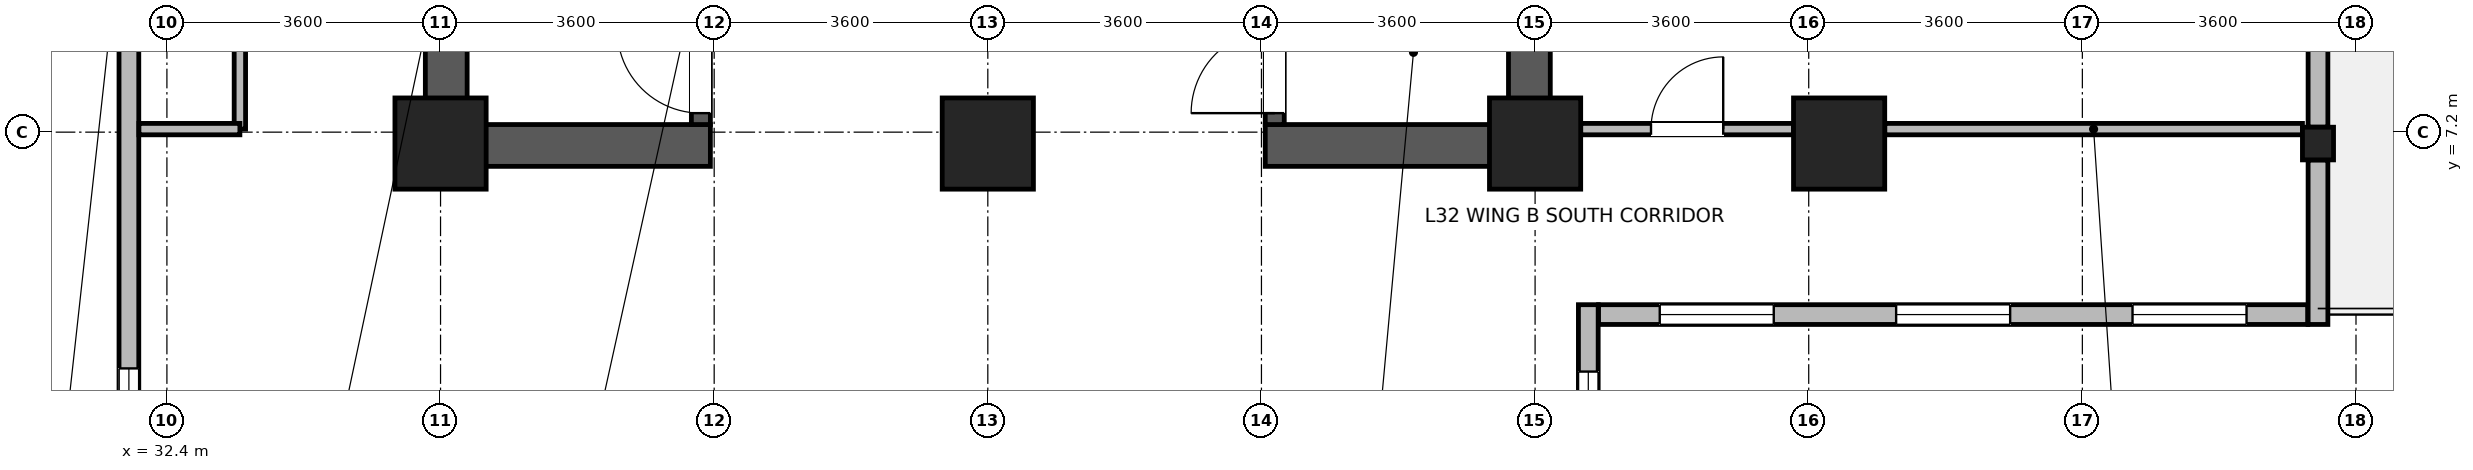
"""IFC4 building model, lengths in metres.
Left out: names, types, materials, properties, quantities, classifications, styles, units other than length and angle.
Written with IfcOpenShell. Run it as: python <this file> out.ifc"""

import sys

from ifc_helpers import new_model, si_unit, direction, frame, frame_2d, origin, origin_2d, place, context, subcontext, project, spatial, rectangle, i_section, extrude, source, transform, mapped, element, fill, save


model = new_model("IFC4")
c1 = context("Model", 3, precision=1e-05, world=origin(), true_north=direction((0.0, 1.0)))
c2 = subcontext(c1, "Body", "Model", "MODEL_VIEW")
j1 = project(units=[si_unit("LENGTHUNIT", "METRE"), si_unit("PLANEANGLEUNIT", "RADIAN")], contexts=[c1])
p1 = place(None, origin())
s1 = spatial("IfcSite", under=j1, at=p1, CompositionType="ELEMENT")
p2 = place(p1, origin())
s2 = spatial("IfcBuilding", under=s1, at=p2, CompositionType="ELEMENT")
p3 = place(p2, frame((0.0, 0.0, 126.7)))
s3 = spatial("IfcBuildingStorey", under=s2, at=p3, CompositionType="ELEMENT", Elevation=126.7)
for number, where, z_axis, x_axis in (
    (1, (36.075, 6.75, 0.0), (0.0, 0.0, 1.0), (0.0, 1.0, 0.0)),
    (2, (50.325, 6.75, 0.0), (0.0, 0.0, 1.0), (0.0, 1.0, 0.0)),
):
    element("IfcWall", number, at=place(p3, frame(where, z_axis=z_axis, x_axis=x_axis)), inside=s3, PredefinedType="SHEAR", context=c2, shape_type="SweptSolid", body=[
        extrude(rectangle(XDim=8.1, YDim=0.55, at=frame_2d((4.05, 0.0))), origin(), (0.0, 0.0, 1.0), 3.34),
    ])
for number, where, z_axis, x_axis in (
    (3, (36.35, 7.025, 0.0), (0.0, 0.0, 1.0), (1.0, 0.0, 0.0)),
    (4, (46.85, 7.025, 0.0), (0.0, 0.0, 1.0), (1.0, 0.0, 0.0)),
):
    element("IfcWall", number, at=place(p3, frame(where, z_axis=z_axis, x_axis=x_axis)), inside=s3, PredefinedType="SHEAR", context=c2, shape_type="SweptSolid", body=[
        extrude(rectangle(XDim=3.2, YDim=0.55, at=frame_2d((1.6, 0.0))), origin(), (0.0, 0.0, 1.0), 3.34),
    ])
p4 = place(p3, frame((39.425, 7.3, 0.0), z_axis=(0.0, 0.0, 1.0), x_axis=(0.0, 1.0, 0.0)))
e5 = element("IfcWall", 5, at=p4, inside=s3, PredefinedType="SHEAR", context=c2, shape_type="SweptSolid", body=[
    extrude(rectangle(XDim=7.0, YDim=0.25, at=frame_2d((3.5, 0.0))), origin(), (0.0, 0.0, 1.0), 3.34),
])
p5 = place(p4, frame((0.15, 0.0, 0.0)))
e6 = element("IfcOpeningElement", 6, at=p5, cuts=e5, PredefinedType="OPENING", context=c2, shape_type="SweptSolid", body=[
    extrude(rectangle(XDim=1.1, YDim=2.08, at=frame_2d((0.55, 1.04))), frame((0.0, 0.135, 0.0), z_axis=(0.0, -1.0, 0.0), x_axis=(1.0, 0.0, 0.0)), (0.0, 0.0, 1.0), 0.27),
])
p6 = place(p3, frame((46.975, 7.3, 0.0), z_axis=(0.0, 0.0, 1.0), x_axis=(0.0, 1.0, 0.0)))
e7 = element("IfcWall", 7, at=p6, inside=s3, PredefinedType="SHEAR", context=c2, shape_type="SweptSolid", body=[
    extrude(rectangle(XDim=7.0, YDim=0.25, at=frame_2d((3.5, 0.0))), origin(), (0.0, 0.0, 1.0), 3.34),
])
p7 = place(p6, frame((0.15, 0.0, 0.0)))
e8 = element("IfcOpeningElement", 8, at=p7, cuts=e7, PredefinedType="OPENING", context=c2, shape_type="SweptSolid", body=[
    extrude(rectangle(XDim=1.1, YDim=2.08, at=frame_2d((0.55, 1.04))), frame((0.0, 0.135, 0.0), z_axis=(0.0, -1.0, 0.0), x_axis=(1.0, 0.0, 0.0)), (0.0, 0.0, 1.0), 0.27),
])
m1 = source(origin(), c2, "Body", "SweptSolid", [
    extrude(rectangle(XDim=1.2, YDim=1.2, at=origin_2d()), origin(), (0.0, 0.0, 1.0), 3.7),
])
for number, where, z_axis, x_axis in (
    (9, (36.0, 7.05, 0.0), (0.0, 0.0, 1.0), (1.0, 0.0, 0.0)),
    (10, (43.2, 7.05, 0.0), (0.0, 0.0, 1.0), (1.0, 0.0, 0.0)),
    (11, (50.4, 7.05, 0.0), (0.0, 0.0, 1.0), (1.0, 0.0, 0.0)),
    (12, (54.4, 7.05, 0.0), (0.0, 0.0, 1.0), (1.0, 0.0, 0.0)),
):
    element("IfcColumn", number, at=place(p3, frame(where, z_axis=z_axis, x_axis=x_axis)), inside=s3, PredefinedType="COLUMN", context=c2, shape_type="MappedRepresentation", body=[
        mapped(m1, transform((0.0, 0.0, 0.0), x_axis=(1.0, 0.0, 0.0), y_axis=(0.0, 1.0, 0.0), z_axis=(0.0, 0.0, 1.0), scale=1.0)),
    ])
m2 = source(origin(), c2, "Body", "SweptSolid", [
    extrude(i_section(OverallWidth=0.409, OverallDepth=0.43, WebThickness=0.024, FlangeThickness=0.033, FilletRadius=0.015, at=origin_2d()), origin(), (0.0, 0.0, 1.0), 3.7),
])
p8 = place(p3, frame((60.7, 7.05, 0.0), z_axis=(0.0, 0.0, 1.0), x_axis=(1.0, 0.0, 0.0)))
e13 = element("IfcColumn", 13, at=p8, inside=s3, PredefinedType="COLUMN", context=c2, shape_type="MappedRepresentation", body=[
    mapped(m2, transform((0.0, 0.0, 0.0), x_axis=(1.0, 0.0, 0.0), y_axis=(0.0, 1.0, 0.0), z_axis=(0.0, 0.0, 1.0), scale=1.0)),
])
p9 = place(p3, frame((51.1, 4.93, 0.0), z_axis=(0.0, 0.0, 1.0), x_axis=(0.0, -1.0, 0.0)))
e14 = element("IfcWall", 14, at=p9, inside=s3, PredefinedType="STANDARD", context=c2, shape_type="SweptSolid", body=[
    extrude(rectangle(XDim=3.26, YDim=0.26, at=frame_2d((1.63, 0.0))), origin(), (0.0, 0.0, 1.0), 3.32),
])
p10 = place(p9, frame((0.88, 0.0, 0.85)))
e15 = element("IfcOpeningElement", 15, at=p10, cuts=e14, PredefinedType="OPENING", context=c2, shape_type="SweptSolid", body=[
    extrude(rectangle(XDim=1.5, YDim=1.85, at=frame_2d((0.75, 0.925))), frame((0.0, 0.14, 0.0), z_axis=(0.0, -1.0, 0.0), x_axis=(1.0, 0.0, 0.0)), (0.0, 0.0, 1.0), 0.28),
])
p11 = place(p3, frame((60.565, 4.8, 0.0), z_axis=(0.0, 0.0, 1.0), x_axis=(-1.0, 0.0, 0.0)))
e16 = element("IfcWall", 16, at=p11, inside=s3, PredefinedType="STANDARD", context=c2, shape_type="SweptSolid", body=[
    extrude(rectangle(XDim=9.33, YDim=0.26, at=frame_2d((4.665, 0.0))), origin(), (0.0, 0.0, 1.0), 3.32),
])
p12 = place(p11, frame((0.805, 0.0, 0.85)))
e17 = element("IfcOpeningElement", 17, at=p12, cuts=e16, PredefinedType="OPENING", context=c2, shape_type="SweptSolid", body=[
    extrude(rectangle(XDim=1.5, YDim=1.85, at=frame_2d((0.75, 0.925))), frame((0.0, 0.14, 0.0), z_axis=(0.0, -1.0, 0.0), x_axis=(1.0, 0.0, 0.0)), (0.0, 0.0, 1.0), 0.28),
])
p13 = place(p11, frame((3.915, 0.0, 0.85)))
e18 = element("IfcOpeningElement", 18, at=p13, cuts=e16, PredefinedType="OPENING", context=c2, shape_type="SweptSolid", body=[
    extrude(rectangle(XDim=1.5, YDim=1.85, at=frame_2d((0.75, 0.925))), frame((0.0, 0.14, 0.0), z_axis=(0.0, -1.0, 0.0), x_axis=(1.0, 0.0, 0.0)), (0.0, 0.0, 1.0), 0.28),
])
p14 = place(p11, frame((7.025, 0.0, 0.85)))
e19 = element("IfcOpeningElement", 19, at=p14, cuts=e16, PredefinedType="OPENING", context=c2, shape_type="SweptSolid", body=[
    extrude(rectangle(XDim=1.5, YDim=1.85, at=frame_2d((0.75, 0.925))), frame((0.0, 0.14, 0.0), z_axis=(0.0, -1.0, 0.0), x_axis=(1.0, 0.0, 0.0)), (0.0, 0.0, 1.0), 0.28),
])
p15 = place(p3, frame((60.7, 6.834, 0.0), z_axis=(0.0, 0.0, 1.0), x_axis=(0.0, -1.0, 0.0)))
e20 = element("IfcWall", 20, at=p15, inside=s3, PredefinedType="STANDARD", context=c2, shape_type="SweptSolid", body=[
    extrude(rectangle(XDim=2.164, YDim=0.26, at=frame_2d((1.082, 0.0))), origin(), (0.0, 0.0, 1.0), 3.32),
])
p16 = place(p3, frame((60.7, 14.334, 0.0), z_axis=(0.0, 0.0, 1.0), x_axis=(0.0, -1.0, 0.0)))
e21 = element("IfcWall", 21, at=p16, inside=s3, PredefinedType="STANDARD", context=c2, shape_type="SweptSolid", body=[
    extrude(rectangle(XDim=7.068, YDim=0.26, at=frame_2d((3.534, 0.0))), origin(), (0.0, 0.0, 1.0), 2.87),
])
p17 = place(p16, frame((2.784, 0.0, 0.0)))
e22 = element("IfcOpeningElement", 22, at=p17, cuts=e21, PredefinedType="OPENING", context=c2, shape_type="SweptSolid", body=[
    extrude(rectangle(XDim=1.5, YDim=2.15, at=frame_2d((0.75, 1.075))), frame((0.0, 0.14, 0.0), z_axis=(0.0, -1.0, 0.0), x_axis=(1.0, 0.0, 0.0)), (0.0, 0.0, 1.0), 0.28),
])
p18 = place(p16, frame((1.017, 0.0, 0.85)))
e23 = element("IfcOpeningElement", 23, at=p18, cuts=e21, PredefinedType="OPENING", context=c2, shape_type="SweptSolid", body=[
    extrude(rectangle(XDim=1.5, YDim=1.85, at=frame_2d((0.75, 0.925))), frame((0.0, 0.14, 0.0), z_axis=(0.0, -1.0, 0.0), x_axis=(1.0, 0.0, 0.0)), (0.0, 0.0, 1.0), 0.28),
])
p19 = place(p16, frame((4.551, 0.0, 0.85)))
e24 = element("IfcOpeningElement", 24, at=p19, cuts=e21, PredefinedType="OPENING", context=c2, shape_type="SweptSolid", body=[
    extrude(rectangle(XDim=1.5, YDim=1.85, at=frame_2d((0.75, 0.925))), frame((0.0, 0.14, 0.0), z_axis=(0.0, -1.0, 0.0), x_axis=(1.0, 0.0, 0.0)), (0.0, 0.0, 1.0), 0.28),
])
p20 = place(p3, frame((31.9, 1.67, 0.0), z_axis=(0.0, 0.0, 1.0), x_axis=(0.0, 1.0, 0.0)))
e25 = element("IfcWall", 25, at=p20, inside=s3, PredefinedType="STANDARD", context=c2, shape_type="SweptSolid", body=[
    extrude(rectangle(XDim=20.06, YDim=0.26, at=frame_2d((10.03, 0.0))), origin(), (0.0, 0.0, 1.0), 3.32),
])
p21 = place(p20, frame((0.922, 0.0, 0.85)))
e26 = element("IfcOpeningElement", 26, at=p21, cuts=e25, PredefinedType="OPENING", context=c2, shape_type="SweptSolid", body=[
    extrude(rectangle(XDim=1.5, YDim=1.85, at=frame_2d((0.75, 0.925))), frame((0.0, 0.14, 0.0), z_axis=(0.0, -1.0, 0.0), x_axis=(1.0, 0.0, 0.0)), (0.0, 0.0, 1.0), 0.28),
])
p22 = place(p20, frame((7.608, 0.0, 0.85)))
e27 = element("IfcOpeningElement", 27, at=p22, cuts=e25, PredefinedType="OPENING", context=c2, shape_type="SweptSolid", body=[
    extrude(rectangle(XDim=1.5, YDim=1.85, at=frame_2d((0.75, 0.925))), frame((0.0, 0.14, 0.0), z_axis=(0.0, -1.0, 0.0), x_axis=(1.0, 0.0, 0.0)), (0.0, 0.0, 1.0), 0.28),
])
p23 = place(p20, frame((10.952, 0.0, 0.85)))
e28 = element("IfcOpeningElement", 28, at=p23, cuts=e25, PredefinedType="OPENING", context=c2, shape_type="SweptSolid", body=[
    extrude(rectangle(XDim=1.5, YDim=1.85, at=frame_2d((0.75, 0.925))), frame((0.0, 0.14, 0.0), z_axis=(0.0, -1.0, 0.0), x_axis=(1.0, 0.0, 0.0)), (0.0, 0.0, 1.0), 0.28),
])
p24 = place(p20, frame((14.295, 0.0, 0.85)))
e29 = element("IfcOpeningElement", 29, at=p24, cuts=e25, PredefinedType="OPENING", context=c2, shape_type="SweptSolid", body=[
    extrude(rectangle(XDim=1.5, YDim=1.85, at=frame_2d((0.75, 0.925))), frame((0.0, 0.14, 0.0), z_axis=(0.0, -1.0, 0.0), x_axis=(1.0, 0.0, 0.0)), (0.0, 0.0, 1.0), 0.28),
])
p25 = place(p20, frame((17.638, 0.0, 0.85)))
e30 = element("IfcOpeningElement", 30, at=p25, cuts=e25, PredefinedType="OPENING", context=c2, shape_type="SweptSolid", body=[
    extrude(rectangle(XDim=1.5, YDim=1.85, at=frame_2d((0.75, 0.925))), frame((0.0, 0.14, 0.0), z_axis=(0.0, -1.0, 0.0), x_axis=(1.0, 0.0, 0.0)), (0.0, 0.0, 1.0), 0.28),
])
p26 = place(p3, frame((51.0, 7.24, 0.0), z_axis=(0.0, 0.0, 1.0), x_axis=(1.0, 0.0, 0.0)))
e31 = element("IfcWall", 31, at=p26, inside=s3, PredefinedType="PARTITIONING", context=c2, shape_type="SweptSolid", body=[
    extrude(rectangle(XDim=2.8, YDim=0.15, at=frame_2d((1.4, 0.0))), origin(), (0.0, 0.0, 1.0), 2.67),
])
p27 = place(p26, frame((0.925, 0.0, 0.0)))
e32 = element("IfcOpeningElement", 32, at=p27, cuts=e31, PredefinedType="OPENING", context=c2, shape_type="SweptSolid", body=[
    extrude(rectangle(XDim=0.95, YDim=2.1, at=frame_2d((0.475, 1.05))), frame((0.0, 0.085, 0.0), z_axis=(0.0, -1.0, 0.0), x_axis=(1.0, 0.0, 0.0)), (0.0, 0.0, 1.0), 0.17),
])
p28 = place(p3, frame((55.0, 7.24, 0.0), z_axis=(0.0, 0.0, 1.0), x_axis=(1.0, 0.0, 0.0)))
e33 = element("IfcWall", 33, at=p28, inside=s3, PredefinedType="PARTITIONING", context=c2, shape_type="SweptSolid", body=[
    extrude(rectangle(XDim=5.496, YDim=0.15, at=frame_2d((2.748, 0.0))), origin(), (0.0, 0.0, 1.0), 2.67),
])
p29 = place(p3, frame((33.36, 7.24, 0.0), z_axis=(0.0, 0.0, 1.0), x_axis=(0.0, 1.0, 0.0)))
e34 = element("IfcWall", 34, at=p29, inside=s3, PredefinedType="PARTITIONING", context=c2, shape_type="SweptSolid", body=[
    extrude(rectangle(XDim=7.26, YDim=0.15, at=frame_2d((3.63, 0.0))), origin(), (0.0, 0.0, 1.0), 3.32),
])
p30 = place(p29, frame((2.98, 0.0, 0.0)))
e35 = element("IfcOpeningElement", 35, at=p30, cuts=e34, PredefinedType="OPENING", context=c2, shape_type="SweptSolid", body=[
    extrude(rectangle(XDim=1.3, YDim=2.12, at=frame_2d((0.65, 1.06))), frame((0.0, 0.085, 0.0), z_axis=(0.0, -1.0, 0.0), x_axis=(1.0, 0.0, 0.0)), (0.0, 0.0, 1.0), 0.17),
])
p31 = place(p3, frame((32.032, 7.24, 0.0), z_axis=(0.0, 0.0, 1.0), x_axis=(1.0, 0.0, 0.0)))
e36 = element("IfcWall", 36, at=p31, inside=s3, PredefinedType="PARTITIONING", context=c2, shape_type="SweptSolid", body=[
    extrude(rectangle(XDim=1.328, YDim=0.15, at=frame_2d((0.664, 0.0))), origin(), (0.0, 0.0, 1.0), 3.32),
])
p32 = place(p10, origin())
e37 = element("IfcWindow", 37, at=p32, inside=s3, PartitioningType="SINGLE_PANEL", PredefinedType="WINDOW", context=c2, shape_type="SweptSolid", body=[
    extrude(rectangle(XDim=1.5, YDim=1.85, at=frame_2d((0.75, 0.925))), frame((0.0, 0.03, 0.0), z_axis=(0.0, -1.0, 0.0), x_axis=(1.0, 0.0, 0.0)), (0.0, 0.0, 1.0), 0.06),
])
fill(e15, e37)
p33 = place(p12, origin())
e38 = element("IfcWindow", 38, at=p33, inside=s3, PartitioningType="SINGLE_PANEL", PredefinedType="WINDOW", context=c2, shape_type="SweptSolid", body=[
    extrude(rectangle(XDim=1.5, YDim=1.85, at=frame_2d((0.75, 0.925))), frame((0.0, 0.03, 0.0), z_axis=(0.0, -1.0, 0.0), x_axis=(1.0, 0.0, 0.0)), (0.0, 0.0, 1.0), 0.06),
])
fill(e17, e38)
p34 = place(p13, origin())
e39 = element("IfcWindow", 39, at=p34, inside=s3, PartitioningType="SINGLE_PANEL", PredefinedType="WINDOW", context=c2, shape_type="SweptSolid", body=[
    extrude(rectangle(XDim=1.5, YDim=1.85, at=frame_2d((0.75, 0.925))), frame((0.0, 0.03, 0.0), z_axis=(0.0, -1.0, 0.0), x_axis=(1.0, 0.0, 0.0)), (0.0, 0.0, 1.0), 0.06),
])
fill(e18, e39)
p35 = place(p14, origin())
e40 = element("IfcWindow", 40, at=p35, inside=s3, PartitioningType="SINGLE_PANEL", PredefinedType="WINDOW", context=c2, shape_type="SweptSolid", body=[
    extrude(rectangle(XDim=1.5, YDim=1.85, at=frame_2d((0.75, 0.925))), frame((0.0, 0.03, 0.0), z_axis=(0.0, -1.0, 0.0), x_axis=(1.0, 0.0, 0.0)), (0.0, 0.0, 1.0), 0.06),
])
fill(e19, e40)
p36 = place(p21, origin())
e41 = element("IfcWindow", 41, at=p36, inside=s3, PartitioningType="SINGLE_PANEL", PredefinedType="WINDOW", context=c2, shape_type="SweptSolid", body=[
    extrude(rectangle(XDim=1.5, YDim=1.85, at=frame_2d((0.75, 0.925))), frame((0.0, 0.03, 0.0), z_axis=(0.0, -1.0, 0.0), x_axis=(1.0, 0.0, 0.0)), (0.0, 0.0, 1.0), 0.06),
])
fill(e26, e41)
p37 = place(p5, origin())
e42 = element("IfcDoor", 42, at=p37, inside=s3, OperationType="SINGLE_SWING_RIGHT", PredefinedType="DOOR", context=c2, shape_type="SweptSolid", body=[
    extrude(rectangle(XDim=1.1, YDim=2.08, at=frame_2d((0.55, 1.04))), frame((0.0, 0.025, 0.0), z_axis=(0.0, -1.0, 0.0), x_axis=(1.0, 0.0, 0.0)), (0.0, 0.0, 1.0), 0.05),
])
fill(e6, e42)
p38 = place(p7, origin())
e43 = element("IfcDoor", 43, at=p38, inside=s3, OperationType="SINGLE_SWING_LEFT", PredefinedType="DOOR", context=c2, shape_type="SweptSolid", body=[
    extrude(rectangle(XDim=1.1, YDim=2.08, at=frame_2d((0.55, 1.04))), frame((0.0, 0.025, 0.0), z_axis=(0.0, -1.0, 0.0), x_axis=(1.0, 0.0, 0.0)), (0.0, 0.0, 1.0), 0.05),
])
fill(e8, e43)
p39 = place(p27, origin())
e44 = element("IfcDoor", 44, at=p39, inside=s3, OperationType="SINGLE_SWING_RIGHT", PredefinedType="DOOR", context=c2, shape_type="SweptSolid", body=[
    extrude(rectangle(XDim=0.95, YDim=2.1, at=frame_2d((0.475, 1.05))), frame((0.0, 0.025, 0.0), z_axis=(0.0, -1.0, 0.0), x_axis=(1.0, 0.0, 0.0)), (0.0, 0.0, 1.0), 0.05),
])
fill(e32, e44)
save(model, sys.argv[1])
